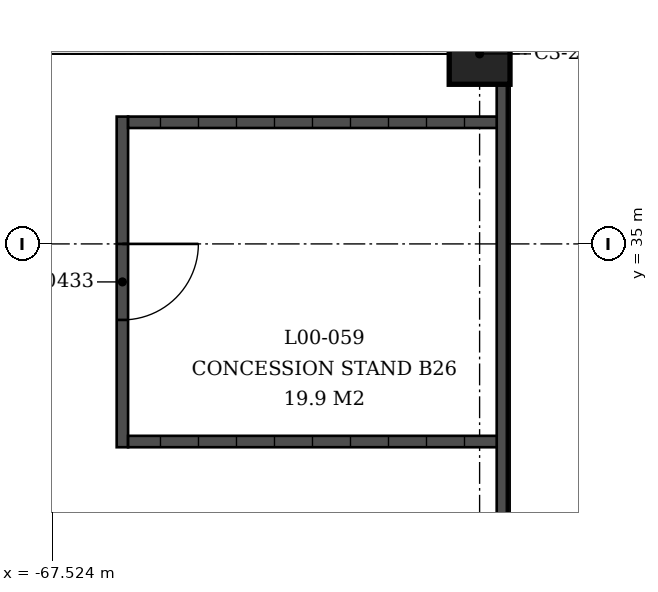
"""IFC4 building model, lengths in metres.
Left out: names, types, materials, properties, quantities, classifications, styles, units other than length and angle.
Written with IfcOpenShell. Run it as: python <this file> out.ifc"""

import sys

from ifc_helpers import new_model, si_unit, direction, frame, frame_2d, origin, origin_2d, place, context, subcontext, project, spatial, rectangle, extrude, element, fill, save


model = new_model("IFC4")
c1 = context("Model", 3, precision=1e-05, world=origin(), true_north=direction((0.0, 1.0)))
c2 = subcontext(c1, "Body", "Model", "MODEL_VIEW")
j1 = project(units=[si_unit("LENGTHUNIT", "METRE"), si_unit("PLANEANGLEUNIT", "RADIAN")], contexts=[c1])
p1 = place(None, origin())
s1 = spatial("IfcSite", under=j1, at=p1, CompositionType="ELEMENT")
p2 = place(p1, origin())
s2 = spatial("IfcBuilding", under=s1, at=p2, CompositionType="ELEMENT")
p3 = place(p2, origin())
s3 = spatial("IfcBuildingStorey", under=s2, at=p3, CompositionType="ELEMENT", Elevation=0.0)
p4 = place(p3, frame((-61.9, 37.5, 0.0), z_axis=(0.0, 0.0, 1.0), x_axis=(0.0, -1.0, 0.0)))
e1 = element("IfcColumn", 1, at=p4, inside=s3, PredefinedType="COLUMN", context=c2, shape_type="SweptSolid", body=[
    extrude(rectangle(XDim=0.8, YDim=0.8, at=origin_2d()), origin(), (0.0, 0.0, 1.0), 4.5),
])
p5 = place(p3, frame((-66.6, 32.325, 0.0), z_axis=(0.0, 0.0, 1.0), x_axis=(0.0, 1.0, 0.0)))
e2 = element("IfcWall", 2, at=p5, inside=s3, PredefinedType="SOLIDWALL", context=c2, shape_type="SweptSolid", body=[
    extrude(rectangle(XDim=4.35, YDim=0.15, at=frame_2d((2.175, 0.0))), origin(), (0.0, 0.0, 1.0), 3.0),
])
p6 = place(p5, frame((1.675, 0.0, 0.0)))
e3 = element("IfcOpeningElement", 3, at=p6, cuts=e2, PredefinedType="OPENING", context=c2, shape_type="SweptSolid", body=[
    extrude(rectangle(XDim=1.0, YDim=2.1, at=frame_2d((0.5, 1.05))), frame((0.0, 0.075, 0.0), z_axis=(0.0, -1.0, 0.0), x_axis=(1.0, 0.0, 0.0)), (0.0, 0.0, 1.0), 0.15),
])
for number, where, z_axis, x_axis in (
    (4, (-61.6, 32.4, 0.0), (0.0, 0.0, 1.0), (-1.0, 0.0, 0.0)),
    (5, (-61.6, 36.6, 0.0), (0.0, 0.0, 1.0), (-1.0, 0.0, 0.0)),
):
    element("IfcWall", number, at=place(p3, frame(where, z_axis=z_axis, x_axis=x_axis)), inside=s3, PredefinedType="SOLIDWALL", context=c2, shape_type="SweptSolid", body=[
        extrude(rectangle(XDim=4.925, YDim=0.15, at=frame_2d((2.462, 0.0))), origin(), (0.0, 0.0, 1.0), 3.0),
    ])
p7 = place(p3, frame((-61.6, 23.0, 0.0), z_axis=(0.0, 0.0, 1.0), x_axis=(0.0, 1.0, 0.0)))
e6 = element("IfcWall", 6, at=p7, inside=s3, PredefinedType="SOLIDWALL", context=c2, shape_type="SweptSolid", body=[
    extrude(rectangle(XDim=14.1, YDim=0.15, at=frame_2d((7.05, 0.0))), origin(), (0.0, 0.0, 1.0), 3.0),
])
p8 = place(p6, origin())
e7 = element("IfcDoor", 7, at=p8, inside=s3, OperationType="SINGLE_SWING_RIGHT", PredefinedType="DOOR", context=c2, shape_type="SweptSolid", body=[
    extrude(rectangle(XDim=1.0, YDim=2.1, at=frame_2d((0.5, 1.05))), frame((0.0, 0.025, 0.0), z_axis=(0.0, -1.0, 0.0), x_axis=(1.0, 0.0, 0.0)), (0.0, 0.0, 1.0), 0.05),
])
fill(e3, e7)
save(model, sys.argv[1])
